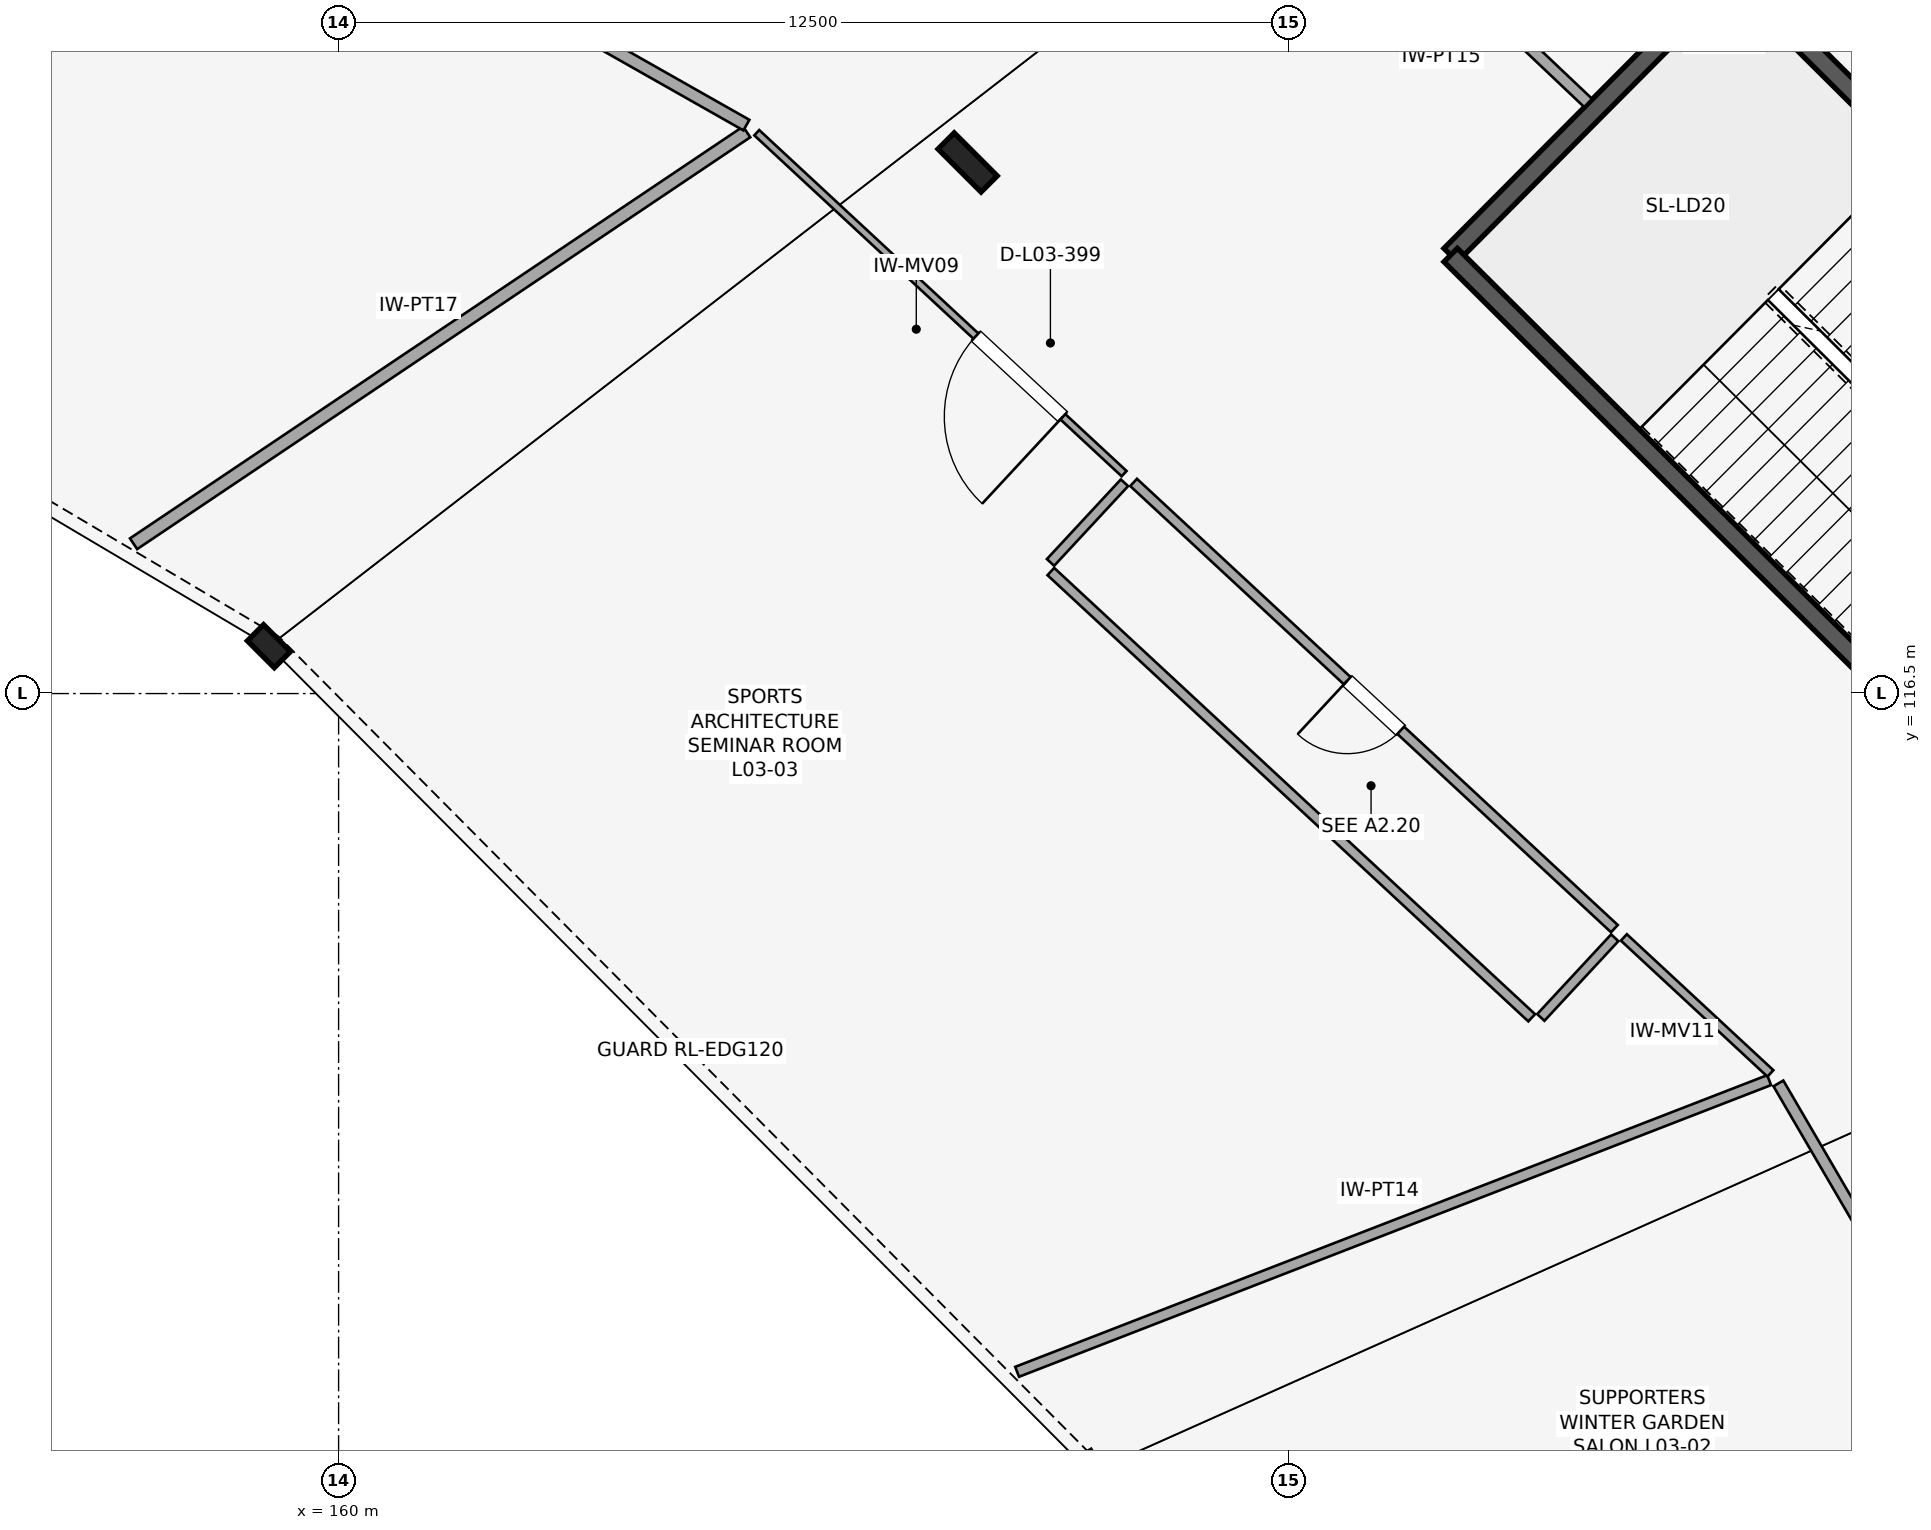
"""IFC4 building model, lengths in metres.
Left out: names, types, materials, properties, quantities, classifications, styles, units other than length and angle.
Written with IfcOpenShell. Run it as: python <this file> out.ifc"""

import sys

from ifc_helpers import new_model, si_unit, direction, frame, frame_2d, origin, origin_2d, place, context, subcontext, project, spatial, rectangle, i_section, extrude, element, fill, save


model = new_model("IFC4")
c1 = context("Model", 3, precision=1e-05, world=origin(), true_north=direction((0.0, 1.0)))
c2 = subcontext(c1, "Body", "Model", "MODEL_VIEW")
j1 = project(units=[si_unit("LENGTHUNIT", "METRE"), si_unit("PLANEANGLEUNIT", "RADIAN")], contexts=[c1])
p1 = place(None, origin())
s1 = spatial("IfcSite", under=j1, at=p1, CompositionType="ELEMENT")
p2 = place(p1, origin())
s2 = spatial("IfcBuilding", under=s1, at=p2, CompositionType="ELEMENT")
p3 = place(p2, frame((0.0, 0.0, 15.6)))
s3 = spatial("IfcBuildingStorey", under=s2, at=p3, CompositionType="ELEMENT", Elevation=15.6)
p4 = place(p3, frame((159.083, 117.123, 0.0), z_axis=(0.0, 0.0, 1.0), x_axis=(0.707106781187, 0.707106781187, 0.0)))
e1 = element("IfcColumn", 1, at=p4, inside=s3, PredefinedType="COLUMN", context=c2, shape_type="SweptSolid", body=[
    extrude(i_section(OverallWidth=0.3, OverallDepth=0.5, WebThickness=0.014, FlangeThickness=0.028, FilletRadius=0.027, at=origin_2d()), origin(), (0.0, 0.0, 1.0), 3.48),
])
p5 = place(p3, frame((168.276, 123.487, 0.0), z_axis=(0.0, 0.0, 1.0), x_axis=(0.707106781187, 0.707106781187, 0.0)))
e2 = element("IfcColumn", 2, at=p5, inside=s3, PredefinedType="COLUMN", context=c2, shape_type="SweptSolid", body=[
    extrude(i_section(OverallWidth=0.3, OverallDepth=0.8, WebThickness=0.018, FlangeThickness=0.033, FilletRadius=0.03, at=origin_2d()), origin(), (0.0, 0.0, 1.0), 5.2),
])
p6 = place(p3, frame((185.742, 118.62, 0.0), z_axis=(0.0, 0.0, 1.0), x_axis=(-0.708891762409, 0.705317282639, 0.0)))
e3 = element("IfcWall", 3, at=p6, inside=s3, PredefinedType="SHEAR", context=c2, shape_type="SweptSolid", body=[
    extrude(rectangle(XDim=10.45, YDim=0.25, at=frame_2d((5.225, 0.0))), origin(), (0.0, 0.0, 1.0), 4.9),
])
p7 = place(p3, frame((178.334, 125.99, 0.0), z_axis=(0.0, 0.0, 1.0), x_axis=(-0.705314141126, -0.708894888067, 0.0)))
e4 = element("IfcWall", 4, at=p7, inside=s3, PredefinedType="SHEAR", context=c2, shape_type="SweptSolid", body=[
    extrude(rectangle(XDim=5.25, YDim=0.25, at=frame_2d((2.625, 0.0))), origin(), (0.0, 0.0, 1.0), 4.9),
])
p8 = place(p3, frame((174.631, 122.269, 0.0), z_axis=(0.0, 0.0, 1.0), x_axis=(0.708891762409, -0.705317282639, 0.0)))
e5 = element("IfcWall", 5, at=p8, inside=s3, PredefinedType="SHEAR", context=c2, shape_type="SweptSolid", body=[
    extrude(rectangle(XDim=10.45, YDim=0.25, at=frame_2d((5.225, 0.0))), origin(), (0.0, 0.0, 1.0), 4.9),
])
p9 = place(p3, frame((187.631, 96.478, 0.0), z_axis=(0.0, 0.0, 1.0), x_axis=(-0.50388511134, 0.863770684019, 0.0)))
e6 = element("IfcWall", 6, at=p9, inside=s3, PredefinedType="PARTITIONING", context=c2, shape_type="SweptSolid", body=[
    extrude(rectangle(XDim=17.242, YDim=0.15, at=frame_2d((8.621, 0.0))), origin(), (0.0, 0.0, 1.0), 2.45),
])
p10 = place(p9, frame((8.171, 0.0, 0.0)))
e7 = element("IfcOpeningElement", 7, at=p10, cuts=e6, PredefinedType="OPENING", context=c2, shape_type="SweptSolid", body=[
    extrude(rectangle(XDim=0.9, YDim=2.24, at=frame_2d((0.45, 1.12))), frame((0.0, 0.085, 0.0), z_axis=(0.0, -1.0, 0.0), x_axis=(1.0, 0.0, 0.0)), (0.0, 0.0, 1.0), 0.17),
])
p11 = place(p3, frame((168.927, 107.577, 0.0), z_axis=(0.0, 0.0, 1.0), x_axis=(0.932330284632, 0.361607854393, 0.0)))
e8 = element("IfcWall", 8, at=p11, inside=s3, PredefinedType="PARTITIONING", context=c2, shape_type="SweptSolid", body=[
    extrude(rectangle(XDim=10.611, YDim=0.14, at=frame_2d((5.306, 0.0))), origin(), (0.0, 0.0, 1.0), 2.45),
])
p12 = place(p3, frame((176.785, 113.407, 0.0), z_axis=(0.0, 0.0, 1.0), x_axis=(-0.73300806751, 0.680219944551, 0.0)))
e9 = element("IfcWall", 9, at=p12, inside=s3, PredefinedType="PARTITIONING", context=c2, shape_type="SweptSolid", body=[
    extrude(rectangle(XDim=8.63, YDim=0.13, at=frame_2d((4.315, 0.0))), origin(), (0.0, 0.0, 1.0), 2.45),
])
p13 = place(p12, frame((3.835, 0.0, 0.0)))
e10 = element("IfcOpeningElement", 10, at=p13, cuts=e9, PredefinedType="OPENING", context=c2, shape_type="SweptSolid", body=[
    extrude(rectangle(XDim=0.96, YDim=2.24, at=frame_2d((0.48, 1.12))), frame((0.0, 0.075, 0.0), z_axis=(0.0, -1.0, 0.0), x_axis=(1.0, 0.0, 0.0)), (0.0, 0.0, 1.0), 0.15),
])
p14 = place(p3, frame((175.696, 112.235, 0.0), z_axis=(0.0, 0.0, 1.0), x_axis=(-0.732994977595, 0.68023405003, 0.0)))
e11 = element("IfcWall", 11, at=p14, inside=s3, PredefinedType="PARTITIONING", context=c2, shape_type="SweptSolid", body=[
    extrude(rectangle(XDim=8.63, YDim=0.13, at=frame_2d((4.315, 0.0))), origin(), (0.0, 0.0, 1.0), 2.45),
])
for number, where, z_axis, x_axis in (
    (12, (176.789, 113.287, 0.0), (0.0, 0.0, 1.0), (-0.68, -0.733, 0.0)),
    (13, (170.339, 119.273, 0.0), (0.0, 0.0, 1.0), (-0.68, -0.733, 0.0)),
):
    element("IfcWall", number, at=place(p3, frame(where, z_axis=z_axis, x_axis=x_axis)), inside=s3, PredefinedType="PARTITIONING", context=c2, shape_type="SweptSolid", body=[
        extrude(rectangle(XDim=1.43, YDim=0.13, at=frame_2d((0.715, 0.0))), origin(), (0.0, 0.0, 1.0), 2.45),
    ])
p15 = place(p3, frame((178.837, 111.503, 0.0), z_axis=(0.0, 0.0, 1.0), x_axis=(-0.732978614057, 0.680251682347, 0.0)))
e14 = element("IfcWall", 14, at=p15, inside=s3, PredefinedType="MOVABLE", context=c2, shape_type="SweptSolid", body=[
    extrude(rectangle(XDim=2.63, YDim=0.115, at=frame_2d((1.315, 0.0))), origin(), (0.0, 0.0, 1.0), 2.45),
])
p16 = place(p3, frame((170.334, 119.393, 0.0), z_axis=(0.0, 0.0, 1.0), x_axis=(-0.732995223413, 0.680233785146, 0.0)))
e15 = element("IfcWall", 15, at=p16, inside=s3, PredefinedType="MOVABLE", context=c2, shape_type="SweptSolid", body=[
    extrude(rectangle(XDim=6.594, YDim=0.095, at=frame_2d((3.297, 0.0))), origin(), (0.0, 0.0, 1.0), 2.45),
])
p17 = place(p16, frame((1.1, 0.0, 0.0)))
e16 = element("IfcOpeningElement", 16, at=p17, cuts=e15, PredefinedType="OPENING", context=c2, shape_type="SweptSolid", body=[
    extrude(rectangle(XDim=1.56, YDim=2.1, at=frame_2d((0.78, 1.05))), frame((0.0, 0.057, 0.0), z_axis=(0.0, -1.0, 0.0), x_axis=(1.0, 0.0, 0.0)), (0.0, 0.0, 1.0), 0.115),
])
p18 = place(p3, frame((157.303, 118.471, 0.0), z_axis=(0.0, 0.0, 1.0), x_axis=(0.830081401919, 0.557642238526, 0.0)))
e17 = element("IfcWall", 17, at=p18, inside=s3, PredefinedType="PARTITIONING", context=c2, shape_type="SweptSolid", body=[
    extrude(rectangle(XDim=9.717, YDim=0.17, at=frame_2d((4.858, 0.0))), origin(), (0.0, 0.0, 1.0), 2.45),
])
p19 = place(p3, frame((165.365, 123.979, 0.0), z_axis=(0.0, 0.0, 1.0), x_axis=(-0.869966621759, 0.493110613377, 0.0)))
e18 = element("IfcWall", 18, at=p19, inside=s3, PredefinedType="PARTITIONING", context=c2, shape_type="SweptSolid", body=[
    extrude(rectangle(XDim=17.529, YDim=0.16, at=frame_2d((8.765, 0.0))), origin(), (0.0, 0.0, 1.0), 2.45),
])
p20 = place(p19, frame((8.094, 0.0, 0.0)))
e19 = element("IfcOpeningElement", 19, at=p20, cuts=e18, PredefinedType="OPENING", context=c2, shape_type="SweptSolid", body=[
    extrude(rectangle(XDim=1.34, YDim=2.24, at=frame_2d((0.67, 1.12))), frame((0.0, 0.09, 0.0), z_axis=(0.0, -1.0, 0.0), x_axis=(1.0, 0.0, 0.0)), (0.0, 0.0, 1.0), 0.18),
])
p21 = place(p3, frame((176.439, 124.27, 0.0), z_axis=(0.0, 0.0, 1.0), x_axis=(-0.72578901813, 0.687917365068, 0.0)))
e20 = element("IfcWall", 20, at=p21, inside=s3, PredefinedType="PARTITIONING", context=c2, shape_type="SweptSolid", body=[
    extrude(rectangle(XDim=6.272, YDim=0.15, at=frame_2d((3.136, 0.0))), origin(), (0.0, 0.0, 1.0), 2.45),
])
p22 = place(p21, frame((2.686, 0.0, 0.0)))
e21 = element("IfcOpeningElement", 21, at=p22, cuts=e20, PredefinedType="OPENING", context=c2, shape_type="SweptSolid", body=[
    extrude(rectangle(XDim=0.9, YDim=2.24, at=frame_2d((0.45, 1.12))), frame((0.0, 0.085, 0.0), z_axis=(0.0, -1.0, 0.0), x_axis=(1.0, 0.0, 0.0)), (0.0, 0.0, 1.0), 0.17),
])
p23 = place(p13, origin())
e22 = element("IfcDoor", 22, at=p23, inside=s3, OperationType="SINGLE_SWING_RIGHT", PredefinedType="DOOR", context=c2, shape_type="SweptSolid", body=[
    extrude(rectangle(XDim=0.96, YDim=2.24, at=frame_2d((0.48, 1.12))), frame((0.0, 0.025, 0.0), z_axis=(0.0, -1.0, 0.0), x_axis=(1.0, 0.0, 0.0)), (0.0, 0.0, 1.0), 0.05),
])
fill(e10, e22)
p24 = place(p17, origin())
e23 = element("IfcDoor", 23, at=p24, inside=s3, OperationType="SINGLE_SWING_LEFT", PredefinedType="DOOR", context=c2, shape_type="SweptSolid", body=[
    extrude(rectangle(XDim=1.56, YDim=2.1, at=frame_2d((0.78, 1.05))), frame((0.0, 0.025, 0.0), z_axis=(0.0, -1.0, 0.0), x_axis=(1.0, 0.0, 0.0)), (0.0, 0.0, 1.0), 0.05),
])
fill(e16, e23)
save(model, sys.argv[1])
